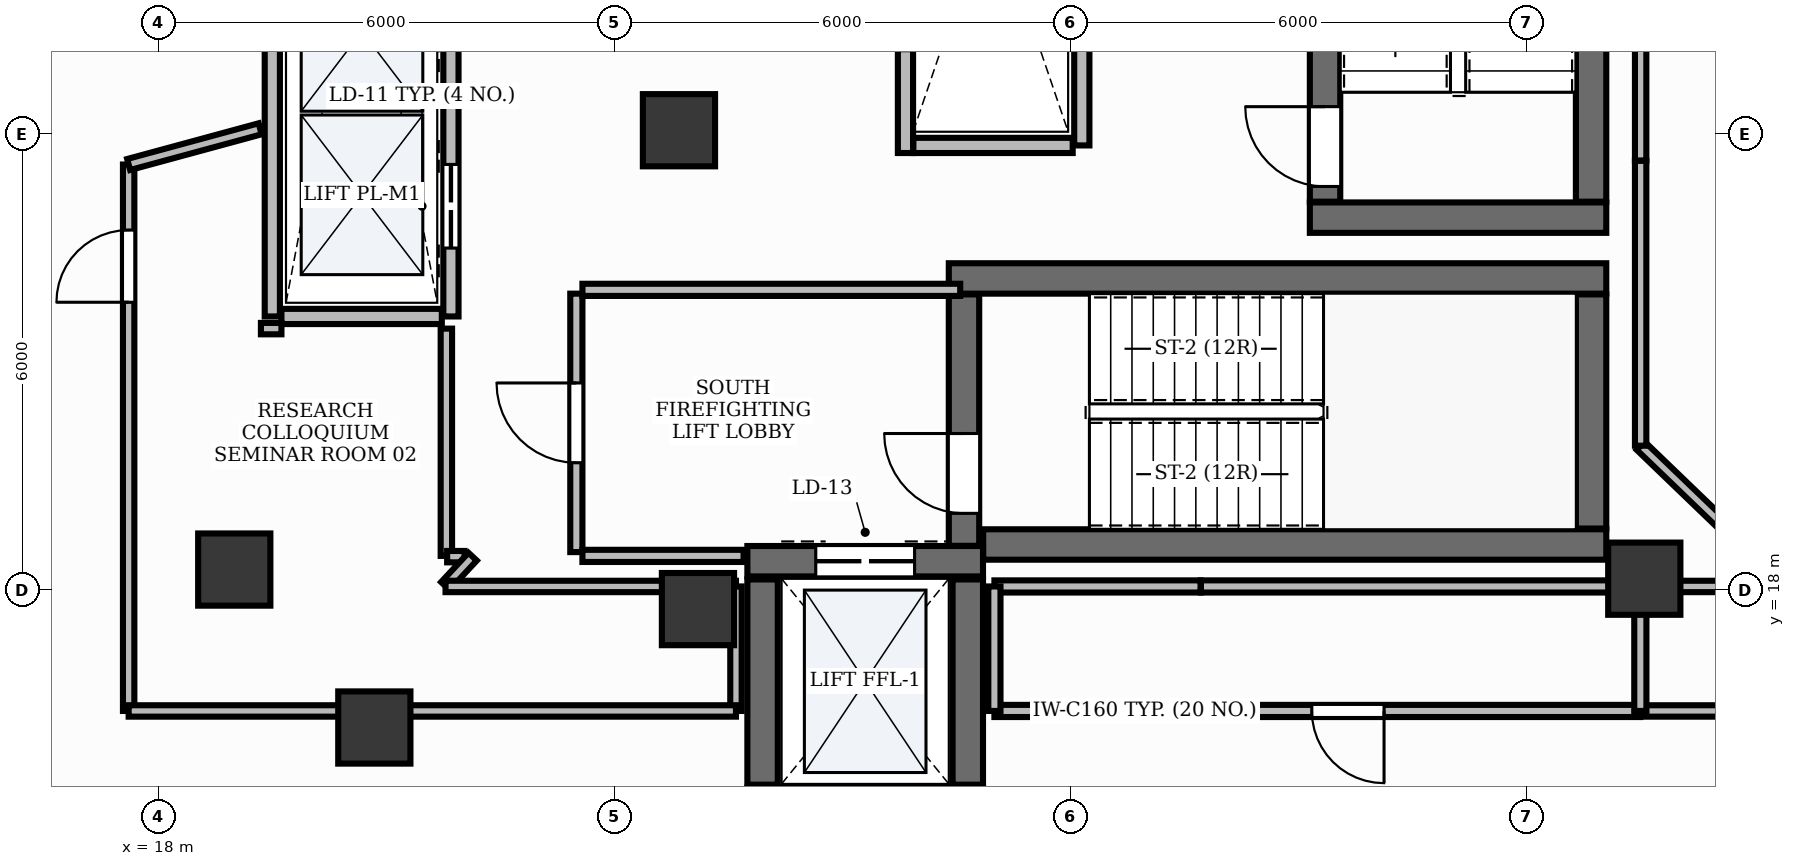
"""IFC4 building model, lengths in metres.
Left out: names, types, materials, properties, quantities, classifications, styles, units other than length and angle.
Written with IfcOpenShell. Run it as: python <this file> out.ifc"""

import sys

from ifc_helpers import new_model, si_unit, direction, frame, frame_2d, origin, origin_2d, place, context, subcontext, project, spatial, rectangle, extrude, element, fill, save


model = new_model("IFC4")
c1 = context("Model", 3, precision=1e-05, world=origin(), true_north=direction((0.0, 1.0)))
c2 = subcontext(c1, "Body", "Model", "MODEL_VIEW")
j1 = project(units=[si_unit("LENGTHUNIT", "METRE"), si_unit("PLANEANGLEUNIT", "RADIAN")], contexts=[c1])
p1 = place(None, origin())
s1 = spatial("IfcSite", under=j1, at=p1, CompositionType="ELEMENT")
p2 = place(p1, origin())
s2 = spatial("IfcBuilding", under=s1, at=p2, CompositionType="ELEMENT")
p3 = place(p2, frame((0.0, 0.0, 158.4)))
s3 = spatial("IfcBuildingStorey", under=s2, at=p3, CompositionType="ELEMENT", Elevation=158.4)
p4 = place(p3, frame((28.852, 18.6, 0.0), z_axis=(0.0, 0.0, 1.0), x_axis=(1.0, 0.0, 0.0)))
e1 = element("IfcWall", 1, at=p4, inside=s3, PredefinedType="SHEAR", context=c2, shape_type="SweptSolid", body=[
    extrude(rectangle(XDim=8.198, YDim=0.4, at=frame_2d((4.099, 0.0))), origin(), (0.0, 0.0, 1.0), 3.9),
])
p5 = place(p3, frame((28.4, 22.1, 0.0), z_axis=(0.0, 0.0, 1.0), x_axis=(1.0, 0.0, 0.0)))
e2 = element("IfcWall", 2, at=p5, inside=s3, PredefinedType="SHEAR", context=c2, shape_type="SweptSolid", body=[
    extrude(rectangle(XDim=8.65, YDim=0.4, at=frame_2d((4.325, 0.0))), origin(), (0.0, 0.0, 1.0), 3.9),
])
p6 = place(p3, frame((36.85, 18.81, 0.0), z_axis=(0.0, 0.0, 1.0), x_axis=(0.0, 1.0, 0.0)))
e3 = element("IfcWall", 3, at=p6, inside=s3, PredefinedType="SHEAR", context=c2, shape_type="SweptSolid", body=[
    extrude(rectangle(XDim=3.08, YDim=0.4, at=frame_2d((1.54, 0.0))), origin(), (0.0, 0.0, 1.0), 3.9),
])
p7 = place(p3, frame((28.6, 18.582, 0.0), z_axis=(0.0, 0.0, 1.0), x_axis=(0.0, 1.0, 0.0)))
e4 = element("IfcWall", 4, at=p7, inside=s3, PredefinedType="SHEAR", context=c2, shape_type="SweptSolid", body=[
    extrude(rectangle(XDim=3.308, YDim=0.4, at=frame_2d((1.654, 0.0))), origin(), (0.0, 0.0, 1.0), 3.9),
])
p8 = place(p7, frame((0.428, 0.0, 0.0)))
e5 = element("IfcOpeningElement", 5, at=p8, cuts=e4, PredefinedType="OPENING", context=c2, shape_type="SweptSolid", body=[
    extrude(rectangle(XDim=1.05, YDim=2.15, at=frame_2d((0.525, 1.075))), frame((0.0, 0.215, 0.0), z_axis=(0.0, -1.0, 0.0), x_axis=(1.0, 0.0, 0.0)), (0.0, 0.0, 1.0), 0.43),
])
p9 = place(p3, frame((33.15, 22.9, 0.0), z_axis=(0.0, 0.0, 1.0), x_axis=(1.0, 0.0, 0.0)))
e6 = element("IfcWall", 6, at=p9, inside=s3, PredefinedType="SHEAR", context=c2, shape_type="SweptSolid", body=[
    extrude(rectangle(XDim=3.9, YDim=0.4, at=frame_2d((1.95, 0.0))), origin(), (0.0, 0.0, 1.0), 3.9),
])
p10 = place(p3, frame((36.85, 23.11, 0.0), z_axis=(0.0, 0.0, 1.0), x_axis=(0.0, 1.0, 0.0)))
e7 = element("IfcWall", 7, at=p10, inside=s3, PredefinedType="SHEAR", context=c2, shape_type="SweptSolid", body=[
    extrude(rectangle(XDim=7.78, YDim=0.4, at=frame_2d((3.89, 0.0))), origin(), (0.0, 0.0, 1.0), 3.9),
])
p11 = place(p3, frame((33.35, 23.11, 0.0), z_axis=(0.0, 0.0, 1.0), x_axis=(0.0, 1.0, 0.0)))
e8 = element("IfcWall", 8, at=p11, inside=s3, PredefinedType="SHEAR", context=c2, shape_type="SweptSolid", body=[
    extrude(rectangle(XDim=7.78, YDim=0.4, at=frame_2d((3.89, 0.0))), origin(), (0.0, 0.0, 1.0), 3.9),
])
p12 = place(p11, frame((0.2, 0.0, 0.0)))
e9 = element("IfcOpeningElement", 9, at=p12, cuts=e8, PredefinedType="OPENING", context=c2, shape_type="SweptSolid", body=[
    extrude(rectangle(XDim=1.05, YDim=2.15, at=frame_2d((0.525, 1.075))), frame((0.0, 0.215, 0.0), z_axis=(0.0, -1.0, 0.0), x_axis=(1.0, 0.0, 0.0)), (0.0, 0.0, 1.0), 0.43),
])
p13 = place(p3, frame((25.75, 18.38, 0.0), z_axis=(0.0, 0.0, 1.0), x_axis=(1.0, 0.0, 0.0)))
e10 = element("IfcWall", 10, at=p13, inside=s3, PredefinedType="SHEAR", context=c2, shape_type="SweptSolid", body=[
    extrude(rectangle(XDim=3.1, YDim=0.4, at=frame_2d((1.55, 0.0))), origin(), (0.0, 0.0, 1.0), 3.9),
])
p14 = place(p13, frame((0.9, 0.0, 0.0)))
e11 = element("IfcOpeningElement", 11, at=p14, cuts=e10, PredefinedType="OPENING", context=c2, shape_type="SweptSolid", body=[
    extrude(rectangle(XDim=1.3, YDim=2.2, at=frame_2d((0.65, 1.1))), frame((0.0, 0.215, 0.0), z_axis=(0.0, -1.0, 0.0), x_axis=(1.0, 0.0, 0.0)), (0.0, 0.0, 1.0), 0.43),
])
for number, where, z_axis, x_axis in (
    (12, (25.95, 15.44, 0.0), (0.0, 0.0, 1.0), (0.0, 1.0, 0.0)),
    (13, (28.65, 15.44, 0.0), (0.0, 0.0, 1.0), (0.0, 1.0, 0.0)),
):
    element("IfcWall", number, at=place(p3, frame(where, z_axis=z_axis, x_axis=x_axis)), inside=s3, PredefinedType="SHEAR", context=c2, shape_type="SweptSolid", body=[
        extrude(rectangle(XDim=2.7, YDim=0.4, at=frame_2d((1.35, 0.0))), origin(), (0.0, 0.0, 1.0), 3.9),
    ])
for number, where, z_axis, x_axis in (
    (14, (24.85, 24.05, -0.0), (0.0, 0.0, 1.0), (1.0, 0.0, 0.0)),
    (15, (25.1, 17.75, -0.0), (0.0, 0.0, 1.0), (1.0, 0.0, 0.0)),
    (16, (37.55, 18.15, -0.0), (0.0, 0.0, 1.0), (1.0, 0.0, 0.0)),
):
    element("IfcColumn", number, at=place(p3, frame(where, z_axis=z_axis, x_axis=x_axis)), inside=s3, PredefinedType="PILASTER", context=c2, shape_type="SweptSolid", body=[
        extrude(rectangle(XDim=0.95, YDim=0.95, at=origin_2d()), origin(), (0.0, 0.0, 1.0), 3.901),
    ])
for number, where, z_axis, x_axis in (
    (17, (19.0, 18.27, -0.0), (0.0, 0.0, 1.0), (1.0, 0.0, 0.0)),
    (18, (20.842, 16.192, -0.0), (0.0, 0.0, 1.0), (1.0, 0.0, 0.0)),
):
    element("IfcColumn", number, at=place(p3, frame(where, z_axis=z_axis, x_axis=x_axis)), inside=s3, PredefinedType="COLUMN", context=c2, shape_type="SweptSolid", body=[
        extrude(rectangle(XDim=0.95, YDim=0.95, at=origin_2d()), origin(), (0.0, 0.0, 1.0), 3.901),
    ])
p15 = place(p3, frame((19.5, 21.6, 0.0), z_axis=(0.0, 0.0, 1.0), x_axis=(0.0, 1.0, 0.0)))
e19 = element("IfcWall", 19, at=p15, inside=s3, PredefinedType="PARTITIONING", context=c2, shape_type="SweptSolid", body=[
    extrude(rectangle(XDim=10.8, YDim=0.2, at=frame_2d((5.4, 0.0))), origin(), (0.0, 0.0, 1.0), 2.91),
])
p16 = place(p3, frame((21.85, 21.6, 0.0), z_axis=(0.0, 0.0, 1.0), x_axis=(0.0, 1.0, 0.0)))
e20 = element("IfcWall", 20, at=p16, inside=s3, PredefinedType="PARTITIONING", context=c2, shape_type="SweptSolid", body=[
    extrude(rectangle(XDim=10.8, YDim=0.2, at=frame_2d((5.4, 0.0))), origin(), (0.0, 0.0, 1.0), 2.91),
])
p17 = place(p16, frame((0.9, 0.0, 0.0)))
e21 = element("IfcOpeningElement", 21, at=p17, cuts=e20, PredefinedType="OPENING", context=c2, shape_type="SweptSolid", body=[
    extrude(rectangle(XDim=1.1, YDim=2.2, at=frame_2d((0.55, 1.1))), frame((0.0, 0.115, 0.0), z_axis=(0.0, -1.0, 0.0), x_axis=(1.0, 0.0, 0.0)), (0.0, 0.0, 1.0), 0.23),
])
p18 = place(p16, frame((3.6, 0.0, 0.0)))
e22 = element("IfcOpeningElement", 22, at=p18, cuts=e20, PredefinedType="OPENING", context=c2, shape_type="SweptSolid", body=[
    extrude(rectangle(XDim=1.1, YDim=2.2, at=frame_2d((0.55, 1.1))), frame((0.0, 0.115, 0.0), z_axis=(0.0, -1.0, 0.0), x_axis=(1.0, 0.0, 0.0)), (0.0, 0.0, 1.0), 0.23),
])
p19 = place(p16, frame((6.3, 0.0, 0.0)))
e23 = element("IfcOpeningElement", 23, at=p19, cuts=e20, PredefinedType="OPENING", context=c2, shape_type="SweptSolid", body=[
    extrude(rectangle(XDim=1.1, YDim=2.2, at=frame_2d((0.55, 1.1))), frame((0.0, 0.115, 0.0), z_axis=(0.0, -1.0, 0.0), x_axis=(1.0, 0.0, 0.0)), (0.0, 0.0, 1.0), 0.23),
])
p20 = place(p16, frame((9.0, 0.0, 0.0)))
e24 = element("IfcOpeningElement", 24, at=p20, cuts=e20, PredefinedType="OPENING", context=c2, shape_type="SweptSolid", body=[
    extrude(rectangle(XDim=1.1, YDim=2.2, at=frame_2d((0.55, 1.1))), frame((0.0, 0.115, 0.0), z_axis=(0.0, -1.0, 0.0), x_axis=(1.0, 0.0, 0.0)), (0.0, 0.0, 1.0), 0.23),
])
p21 = place(p3, frame((19.62, 21.6, 0.0), z_axis=(0.0, 0.0, 1.0), x_axis=(1.0, 0.0, 0.0)))
e25 = element("IfcWall", 25, at=p21, inside=s3, PredefinedType="PARTITIONING", context=c2, shape_type="SweptSolid", body=[
    extrude(rectangle(XDim=2.11, YDim=0.2, at=frame_2d((1.055, 0.0))), origin(), (0.0, 0.0, 1.0), 2.91),
])
p22 = place(p3, frame((27.83, 23.75, 0.0), z_axis=(0.0, 0.0, 1.0), x_axis=(0.0, 1.0, 0.0)))
e26 = element("IfcWall", 26, at=p22, inside=s3, PredefinedType="PARTITIONING", context=c2, shape_type="SweptSolid", body=[
    extrude(rectangle(XDim=1.366, YDim=0.2, at=frame_2d((0.683, 0.0))), origin(), (0.0, 0.0, 1.0), 2.91),
])
p23 = place(p3, frame((30.15, 23.85, 0.0), z_axis=(0.0, 0.0, 1.0), x_axis=(0.0, 1.0, 0.0)))
e27 = element("IfcWall", 27, at=p23, inside=s3, PredefinedType="PARTITIONING", context=c2, shape_type="SweptSolid", body=[
    extrude(rectangle(XDim=6.35, YDim=0.2, at=frame_2d((3.175, 0.0))), origin(), (0.0, 0.0, 1.0), 2.91),
])
p24 = place(p3, frame((27.934, 23.85, 0.0), z_axis=(0.0, 0.0, 1.0), x_axis=(1.0, 0.0, 0.0)))
e28 = element("IfcWall", 28, at=p24, inside=s3, PredefinedType="PARTITIONING", context=c2, shape_type="SweptSolid", body=[
    extrude(rectangle(XDim=2.096, YDim=0.2, at=frame_2d((1.048, 0.0))), origin(), (0.0, 0.0, 1.0), 2.91),
])
p25 = place(p3, frame((23.5, 18.5, 0.0), z_axis=(0.0, 0.0, 1.0), x_axis=(0.0, 1.0, 0.0)))
e29 = element("IfcWall", 29, at=p25, inside=s3, PredefinedType="PARTITIONING", context=c2, shape_type="SweptSolid", body=[
    extrude(rectangle(XDim=3.4, YDim=0.16, at=frame_2d((1.7, 0.0))), origin(), (0.0, 0.0, 1.0), 2.91),
])
p26 = place(p25, frame((1.175, 0.0, 0.0)))
e30 = element("IfcOpeningElement", 30, at=p26, cuts=e29, PredefinedType="OPENING", context=c2, shape_type="SweptSolid", body=[
    extrude(rectangle(XDim=1.05, YDim=2.15, at=frame_2d((0.525, 1.075))), frame((0.0, 0.095, 0.0), z_axis=(0.0, -1.0, 0.0), x_axis=(1.0, 0.0, 0.0)), (0.0, 0.0, 1.0), 0.19),
])
p27 = place(p3, frame((23.58, 21.95, 0.0), z_axis=(0.0, 0.0, 1.0), x_axis=(1.0, 0.0, 0.0)))
e31 = element("IfcWall", 31, at=p27, inside=s3, PredefinedType="PARTITIONING", context=c2, shape_type="SweptSolid", body=[
    extrude(rectangle(XDim=4.97, YDim=0.16, at=frame_2d((2.485, 0.0))), origin(), (0.0, 0.0, 1.0), 2.91),
])
p28 = place(p3, frame((23.58, 18.45, 0.0), z_axis=(0.0, 0.0, 1.0), x_axis=(1.0, 0.0, 0.0)))
e32 = element("IfcWall", 32, at=p28, inside=s3, PredefinedType="PARTITIONING", context=c2, shape_type="SweptSolid", body=[
    extrude(rectangle(XDim=2.12, YDim=0.16, at=frame_2d((1.06, 0.0))), origin(), (0.0, 0.0, 1.0), 2.91),
])
p29 = place(p3, frame((17.61, 16.41, 0.0), z_axis=(0.0, 0.0, 1.0), x_axis=(0.0, 1.0, 0.0)))
e33 = element("IfcWall", 33, at=p29, inside=s3, PredefinedType="PARTITIONING", context=c2, shape_type="SweptSolid", body=[
    extrude(rectangle(XDim=7.189, YDim=0.15, at=frame_2d((3.594, 0.0))), origin(), (0.0, 0.0, 1.0), 2.91),
])
p30 = place(p29, frame((5.377, 0.0, 0.0)))
e34 = element("IfcOpeningElement", 34, at=p30, cuts=e33, PredefinedType="OPENING", context=c2, shape_type="SweptSolid", body=[
    extrude(rectangle(XDim=0.95, YDim=2.15, at=frame_2d((0.475, 1.075))), frame((0.0, 0.09, 0.0), z_axis=(0.0, -1.0, 0.0), x_axis=(1.0, 0.0, 0.0)), (0.0, 0.0, 1.0), 0.18),
])
p31 = place(p3, frame((37.498, 16.41, 0.0), z_axis=(0.0, 0.0, 1.0), x_axis=(-1.0, 0.0, 0.0)))
e35 = element("IfcWall", 35, at=p31, inside=s3, PredefinedType="PARTITIONING", context=c2, shape_type="SweptSolid", body=[
    extrude(rectangle(XDim=8.498, YDim=0.16, at=frame_2d((4.249, 0.0))), origin(), (0.0, 0.0, 1.0), 2.91),
])
p32 = place(p31, frame((3.372, 0.0, 0.0)))
e36 = element("IfcOpeningElement", 36, at=p32, cuts=e35, PredefinedType="OPENING", context=c2, shape_type="SweptSolid", body=[
    extrude(rectangle(XDim=0.95, YDim=2.15, at=frame_2d((0.475, 1.075))), frame((0.0, 0.095, 0.0), z_axis=(0.0, -1.0, 0.0), x_axis=(1.0, 0.0, 0.0)), (0.0, 0.0, 1.0), 0.19),
])
p33 = place(p3, frame((44.5, 16.41, 0.0), z_axis=(0.0, 0.0, 1.0), x_axis=(-1.0, 0.0, 0.0)))
e37 = element("IfcWall", 37, at=p33, inside=s3, PredefinedType="PARTITIONING", context=c2, shape_type="SweptSolid", body=[
    extrude(rectangle(XDim=6.992, YDim=0.15, at=frame_2d((3.496, 0.0))), origin(), (0.0, 0.0, 1.0), 2.91),
])
p34 = place(p33, frame((4.334, 0.0, 0.0)))
e38 = element("IfcOpeningElement", 38, at=p34, cuts=e37, PredefinedType="OPENING", context=c2, shape_type="SweptSolid", body=[
    extrude(rectangle(XDim=0.95, YDim=2.15, at=frame_2d((0.475, 1.075))), frame((0.0, 0.09, 0.0), z_axis=(0.0, -1.0, 0.0), x_axis=(1.0, 0.0, 0.0)), (0.0, 0.0, 1.0), 0.18),
])
p35 = place(p3, frame((19.35, 21.44, 0.0), z_axis=(0.0, 0.0, 1.0), x_axis=(1.0, 0.0, 0.0)))
e39 = element("IfcWall", 39, at=p35, inside=s3, PredefinedType="PARTITIONING", context=c2, shape_type="SweptSolid", body=[
    extrude(rectangle(XDim=0.27, YDim=0.15, at=frame_2d((0.135, 0.0))), origin(), (0.0, 0.0, 1.0), 2.91),
])
p36 = place(p3, frame((21.79, 21.44, 0.0), z_axis=(0.0, 0.0, 1.0), x_axis=(0.0, -1.0, 0.0)))
e40 = element("IfcWall", 40, at=p36, inside=s3, PredefinedType="PARTITIONING", context=c2, shape_type="SweptSolid", body=[
    extrude(rectangle(XDim=2.99, YDim=0.15, at=frame_2d((1.495, 0.0))), origin(), (0.0, 0.0, 1.0), 2.91),
])
p37 = place(p3, frame((21.8, 18.44, 0.0), z_axis=(0.0, 0.0, 1.0), x_axis=(1.0, 0.0, 0.0)))
e41 = element("IfcWall", 41, at=p37, inside=s3, PredefinedType="PARTITIONING", context=c2, shape_type="SweptSolid", body=[
    extrude(rectangle(XDim=0.229, YDim=0.15, at=frame_2d((0.114, 0.0))), origin(), (0.0, 0.0, 1.0), 2.91),
])
p38 = place(p3, frame((22.135, 18.44, 0.0), z_axis=(0.0, 0.0, 1.0), x_axis=(-0.68187219697, -0.731471330265, 0.0)))
e42 = element("IfcWall", 42, at=p38, inside=s3, PredefinedType="PARTITIONING", context=c2, shape_type="SweptSolid", body=[
    extrude(rectangle(XDim=0.527, YDim=0.15, at=frame_2d((0.263, 0.0))), origin(), (0.0, 0.0, 1.0), 2.91),
])
p39 = place(p3, frame((21.779, 18.048, 0.0), z_axis=(0.0, 0.0, 1.0), x_axis=(1.0, 0.0, 0.0)))
e43 = element("IfcWall", 43, at=p39, inside=s3, PredefinedType="PARTITIONING", context=c2, shape_type="SweptSolid", body=[
    extrude(rectangle(XDim=3.821, YDim=0.15, at=frame_2d((1.91, 0.0))), origin(), (0.0, 0.0, 1.0), 2.91),
])
p40 = place(p3, frame((25.6, 18.048, 0.0), z_axis=(0.0, 0.0, 1.0), x_axis=(0.0, -1.0, 0.0)))
e44 = element("IfcWall", 44, at=p40, inside=s3, PredefinedType="PARTITIONING", context=c2, shape_type="SweptSolid", body=[
    extrude(rectangle(XDim=1.638, YDim=0.15, at=frame_2d((0.819, 0.0))), origin(), (0.0, 0.0, 1.0), 2.91),
])
p41 = place(p3, frame((25.6, 16.41, 0.0), z_axis=(0.0, 0.0, 1.0), x_axis=(-1.0, 0.0, 0.0)))
e45 = element("IfcWall", 45, at=p41, inside=s3, PredefinedType="PARTITIONING", context=c2, shape_type="SweptSolid", body=[
    extrude(rectangle(XDim=7.99, YDim=0.15, at=frame_2d((3.995, 0.0))), origin(), (0.0, 0.0, 1.0), 2.91),
])
p42 = place(p3, frame((17.61, 23.599, 0.0), z_axis=(0.0, 0.0, 1.0), x_axis=(0.96501483668, 0.262195280255, 0.0)))
e46 = element("IfcWall", 46, at=p42, inside=s3, PredefinedType="PARTITIONING", context=c2, shape_type="SweptSolid", body=[
    extrude(rectangle(XDim=1.792, YDim=0.15, at=frame_2d((0.896, 0.0))), origin(), (0.0, 0.0, 1.0), 2.91),
])
p43 = place(p3, frame((29.0, 18.048, 0.0), z_axis=(0.0, 0.0, 1.0), x_axis=(1.0, 0.0, 0.0)))
e47 = element("IfcWall", 47, at=p43, inside=s3, PredefinedType="PARTITIONING", context=c2, shape_type="SweptSolid", body=[
    extrude(rectangle(XDim=2.713, YDim=0.16, at=frame_2d((1.356, 0.0))), origin(), (0.0, 0.0, 1.0), 2.91),
])
p44 = place(p3, frame((31.717, 18.048, 0.0), z_axis=(0.0, 0.0, 1.0), x_axis=(1.0, 0.0, 0.0)))
e48 = element("IfcWall", 48, at=p44, inside=s3, PredefinedType="PARTITIONING", context=c2, shape_type="SweptSolid", body=[
    extrude(rectangle(XDim=5.781, YDim=0.16, at=frame_2d((2.89, 0.0))), origin(), (0.0, 0.0, 1.0), 2.91),
])
for number, where, z_axis, x_axis in (
    (49, (37.498, 18.048, 0.0), (0.0, 0.0, 1.0), (0.0, -1.0, 0.0)),
    (50, (29.0, 16.41, 0.0), (0.0, 0.0, 1.0), (0.0, 1.0, 0.0)),
):
    element("IfcWall", number, at=place(p3, frame(where, z_axis=z_axis, x_axis=x_axis)), inside=s3, PredefinedType="PARTITIONING", context=c2, shape_type="SweptSolid", body=[
        extrude(rectangle(XDim=1.638, YDim=0.16, at=frame_2d((0.819, 0.0))), origin(), (0.0, 0.0, 1.0), 2.91),
    ])
p45 = place(p3, frame((37.508, 18.048, 0.0), z_axis=(0.0, 0.0, 1.0), x_axis=(1.0, 0.0, 0.0)))
e51 = element("IfcWall", 51, at=p45, inside=s3, PredefinedType="PARTITIONING", context=c2, shape_type="SweptSolid", body=[
    extrude(rectangle(XDim=1.908, YDim=0.15, at=frame_2d((0.954, 0.0))), origin(), (0.0, 0.0, 1.0), 2.91),
])
p46 = place(p3, frame((39.419, 18.055, 0.0), z_axis=(0.0, 0.0, 1.0), x_axis=(-0.720561375154, 0.693391162791, 0.0)))
e52 = element("IfcWall", 52, at=p46, inside=s3, PredefinedType="PARTITIONING", context=c2, shape_type="SweptSolid", body=[
    extrude(rectangle(XDim=2.66, YDim=0.15, at=frame_2d((1.33, 0.0))), origin(), (0.0, 0.0, 1.0), 2.91),
])
p47 = place(p3, frame((37.502, 19.899, 0.0), z_axis=(0.0, 0.0, 1.0), x_axis=(0.0, 1.0, 0.0)))
e53 = element("IfcWall", 53, at=p47, inside=s3, PredefinedType="PARTITIONING", context=c2, shape_type="SweptSolid", body=[
    extrude(rectangle(XDim=3.749, YDim=0.15, at=frame_2d((1.874, 0.0))), origin(), (0.0, 0.0, 1.0), 2.91),
])
p48 = place(p3, frame((37.502, 23.652, 0.0), z_axis=(0.0, 0.0, 1.0), x_axis=(0.0, 1.0, 0.0)))
e54 = element("IfcWall", 54, at=p48, inside=s3, PredefinedType="PARTITIONING", context=c2, shape_type="SweptSolid", body=[
    extrude(rectangle(XDim=1.546, YDim=0.15, at=frame_2d((0.773, 0.0))), origin(), (0.0, 0.0, 1.0), 2.91),
])
p49 = place(p8, origin())
e55 = element("IfcDoor", 55, at=p49, inside=s3, OperationType="SINGLE_SWING_RIGHT", PredefinedType="DOOR", context=c2, shape_type="SweptSolid", body=[
    extrude(rectangle(XDim=1.05, YDim=2.15, at=frame_2d((0.525, 1.075))), frame((0.0, 0.025, 0.0), z_axis=(0.0, -1.0, 0.0), x_axis=(1.0, 0.0, 0.0)), (0.0, 0.0, 1.0), 0.05),
])
fill(e5, e55)
p50 = place(p12, origin())
e56 = element("IfcDoor", 56, at=p50, inside=s3, OperationType="SINGLE_SWING_RIGHT", PredefinedType="DOOR", context=c2, shape_type="SweptSolid", body=[
    extrude(rectangle(XDim=1.05, YDim=2.15, at=frame_2d((0.525, 1.075))), frame((0.0, 0.025, 0.0), z_axis=(0.0, -1.0, 0.0), x_axis=(1.0, 0.0, 0.0)), (0.0, 0.0, 1.0), 0.05),
])
fill(e9, e56)
p51 = place(p17, origin())
e57 = element("IfcDoor", 57, at=p51, inside=s3, OperationType="DOUBLE_DOOR_SLIDING", PredefinedType="DOOR", context=c2, shape_type="SweptSolid", body=[
    extrude(rectangle(XDim=1.1, YDim=2.2, at=frame_2d((0.55, 1.1))), frame((0.0, 0.025, 0.0), z_axis=(0.0, -1.0, 0.0), x_axis=(1.0, 0.0, 0.0)), (0.0, 0.0, 1.0), 0.05),
])
fill(e21, e57)
p52 = place(p14, origin())
e58 = element("IfcDoor", 58, at=p52, inside=s3, OperationType="DOUBLE_DOOR_SLIDING", PredefinedType="DOOR", context=c2, shape_type="SweptSolid", body=[
    extrude(rectangle(XDim=1.3, YDim=2.2, at=frame_2d((0.65, 1.1))), frame((0.0, 0.025, 0.0), z_axis=(0.0, -1.0, 0.0), x_axis=(1.0, 0.0, 0.0)), (0.0, 0.0, 1.0), 0.05),
])
fill(e11, e58)
p53 = place(p26, origin())
e59 = element("IfcDoor", 59, at=p53, inside=s3, OperationType="SINGLE_SWING_RIGHT", PredefinedType="DOOR", context=c2, shape_type="SweptSolid", body=[
    extrude(rectangle(XDim=1.05, YDim=2.15, at=frame_2d((0.525, 1.075))), frame((0.0, 0.025, 0.0), z_axis=(0.0, -1.0, 0.0), x_axis=(1.0, 0.0, 0.0)), (0.0, 0.0, 1.0), 0.05),
])
fill(e30, e59)
p54 = place(p30, origin())
e60 = element("IfcDoor", 60, at=p54, inside=s3, OperationType="SINGLE_SWING_LEFT", PredefinedType="DOOR", context=c2, shape_type="SweptSolid", body=[
    extrude(rectangle(XDim=0.95, YDim=2.15, at=frame_2d((0.475, 1.075))), frame((0.0, 0.025, 0.0), z_axis=(0.0, -1.0, 0.0), x_axis=(1.0, 0.0, 0.0)), (0.0, 0.0, 1.0), 0.05),
])
fill(e34, e60)
p55 = place(p32, origin())
e61 = element("IfcDoor", 61, at=p55, inside=s3, OperationType="SINGLE_SWING_LEFT", PredefinedType="DOOR", context=c2, shape_type="SweptSolid", body=[
    extrude(rectangle(XDim=0.95, YDim=2.15, at=frame_2d((0.475, 1.075))), frame((0.0, 0.025, 0.0), z_axis=(0.0, -1.0, 0.0), x_axis=(1.0, 0.0, 0.0)), (0.0, 0.0, 1.0), 0.05),
])
fill(e36, e61)
save(model, sys.argv[1])
